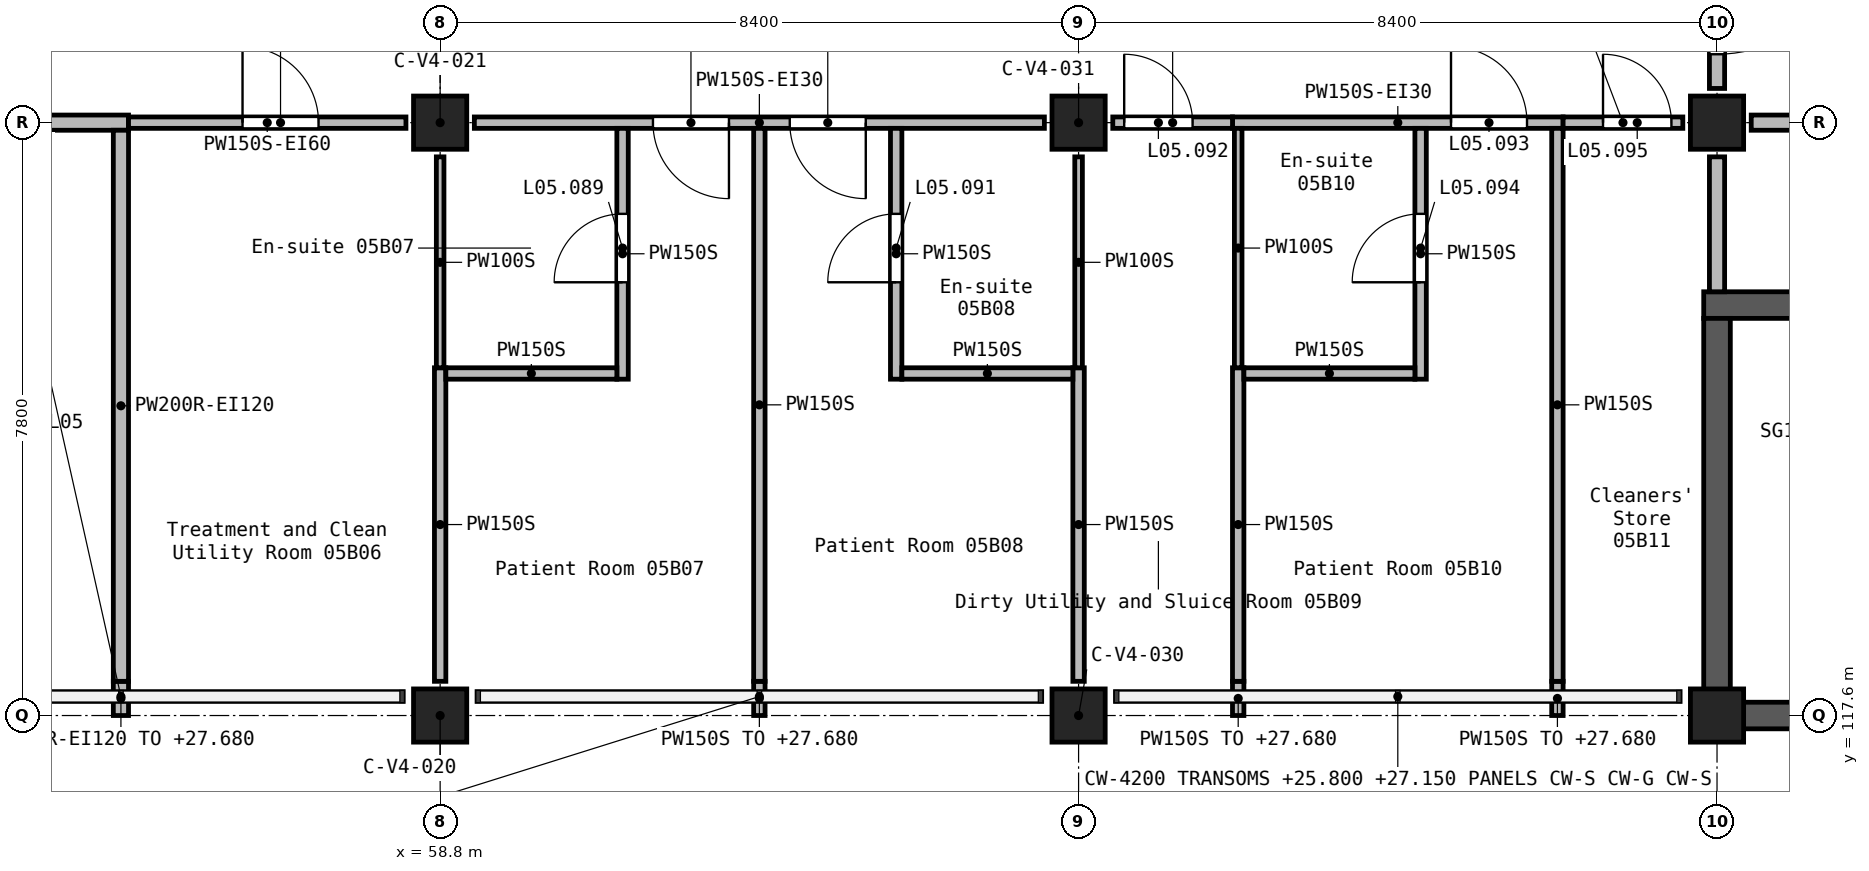
"""IFC4 building model, lengths in metres.
Left out: names, types, materials, properties, quantities, classifications, styles, units other than length and angle.
Written with IfcOpenShell. Run it as: python <this file> out.ifc"""

import sys

from ifc_helpers import new_model, si_unit, direction, frame, frame_2d, origin, origin_2d, place, context, subcontext, project, spatial, rectangle, extrude, element, fill, save


model = new_model("IFC4")
c1 = context("Model", 3, precision=1e-05, world=origin(), true_north=direction((0.0, 1.0)))
c2 = subcontext(c1, "Body", "Model", "MODEL_VIEW")
j1 = project(units=[si_unit("LENGTHUNIT", "METRE"), si_unit("PLANEANGLEUNIT", "RADIAN")], contexts=[c1])
p1 = place(None, origin())
s1 = spatial("IfcSite", under=j1, at=p1, CompositionType="ELEMENT")
p2 = place(p1, origin())
s2 = spatial("IfcBuilding", under=s1, at=p2, CompositionType="ELEMENT")
p3 = place(p2, frame((0.0, 0.0, 24.9)))
s3 = spatial("IfcBuildingStorey", under=s2, at=p3, CompositionType="ELEMENT", Elevation=24.9)
for number, where, z_axis, x_axis in (
    (1, (58.8, 117.6, 0.0), (0.0, 0.0, 1.0), (1.0, 0.0, 0.0)),
    (2, (58.8, 125.4, 0.0), (0.0, 0.0, 1.0), (1.0, 0.0, 0.0)),
    (3, (67.2, 117.6, 0.0), (0.0, 0.0, 1.0), (1.0, 0.0, 0.0)),
    (4, (67.2, 125.4, 0.0), (0.0, 0.0, 1.0), (1.0, 0.0, 0.0)),
    (5, (75.6, 117.6, 0.0), (0.0, 0.0, 1.0), (1.0, 0.0, 0.0)),
    (6, (75.6, 125.4, 0.0), (0.0, 0.0, 1.0), (1.0, 0.0, 0.0)),
):
    element("IfcColumn", number, at=place(p3, frame(where, z_axis=z_axis, x_axis=x_axis)), inside=s3, PredefinedType="COLUMN", context=c2, shape_type="SweptSolid", body=[
        extrude(rectangle(XDim=0.7, YDim=0.7, at=origin_2d()), origin(), (0.0, 0.0, 1.0), 3.9),
    ])
p4 = place(p3, frame((75.425, 123.0, 0.0), z_axis=(0.0, 0.0, 1.0), x_axis=(1.0, 0.0, 0.0)))
e7 = element("IfcWall", 7, at=p4, inside=s3, PredefinedType="SHEAR", context=c2, shape_type="SweptSolid", body=[
    extrude(rectangle(XDim=8.4, YDim=0.35, at=frame_2d((4.2, 0.0))), origin(), (0.0, 0.0, 1.0), 3.9),
])
p5 = place(p4, frame((6.875, 0.0, 0.0)))
e8 = element("IfcOpeningElement", 8, at=p5, cuts=e7, PredefinedType="OPENING", context=c2, shape_type="SweptSolid", body=[
    extrude(rectangle(XDim=1.1, YDim=2.1, at=frame_2d((0.55, 1.05))), frame((0.0, 0.185, 0.0), z_axis=(0.0, -1.0, 0.0), x_axis=(1.0, 0.0, 0.0)), (0.0, 0.0, 1.0), 0.37),
])
p6 = place(p3, frame((75.6, 117.425, 0.0), z_axis=(0.0, 0.0, 1.0), x_axis=(0.0, 1.0, 0.0)))
e9 = element("IfcWall", 9, at=p6, inside=s3, PredefinedType="SHEAR", context=c2, shape_type="SweptSolid", body=[
    extrude(rectangle(XDim=5.4, YDim=0.35, at=frame_2d((2.7, 0.0))), origin(), (0.0, 0.0, 1.0), 3.9),
])
p7 = place(p3, frame((75.775, 117.6, 0.0), z_axis=(0.0, 0.0, 1.0), x_axis=(1.0, 0.0, 0.0)))
e10 = element("IfcWall", 10, at=p7, inside=s3, PredefinedType="SHEAR", context=c2, shape_type="SweptSolid", body=[
    extrude(rectangle(XDim=8.05, YDim=0.35, at=frame_2d((4.025, 0.0))), origin(), (0.0, 0.0, 1.0), 3.9),
])
p8 = place(p3, frame((75.6, 128.55, 0.0), z_axis=(0.0, 0.0, 1.0), x_axis=(0.0, -1.0, 0.0)))
e11 = element("IfcWall", 11, at=p8, inside=s3, PredefinedType="SOLIDWALL", context=c2, shape_type="SweptSolid", body=[
    extrude(rectangle(XDim=2.7, YDim=0.2, at=frame_2d((1.35, 0.0))), origin(), (0.0, 0.0, 1.0), 3.6),
])
p9 = place(p8, frame((0.45, 0.0, 0.0)))
e12 = element("IfcOpeningElement", 12, at=p9, cuts=e11, PredefinedType="OPENING", context=c2, shape_type="SweptSolid", body=[
    extrude(rectangle(XDim=1.8, YDim=2.1, at=frame_2d((0.9, 1.05))), frame((0.0, 0.11, 0.0), z_axis=(0.0, -1.0, 0.0), x_axis=(1.0, 0.0, 0.0)), (0.0, 0.0, 1.0), 0.22),
])
p10 = place(p3, frame((75.6, 124.95, 0.0), z_axis=(0.0, 0.0, 1.0), x_axis=(0.0, -1.0, 0.0)))
e13 = element("IfcWall", 13, at=p10, inside=s3, PredefinedType="SOLIDWALL", context=c2, shape_type="SweptSolid", body=[
    extrude(rectangle(XDim=1.775, YDim=0.2, at=frame_2d((0.887, 0.0))), origin(), (0.0, 0.0, 1.0), 3.6),
])
p11 = place(p3, frame((76.05, 125.4, 0.0), z_axis=(0.0, 0.0, 1.0), x_axis=(1.0, 0.0, 0.0)))
e14 = element("IfcWall", 14, at=p11, inside=s3, PredefinedType="SOLIDWALL", context=c2, shape_type="SweptSolid", body=[
    extrude(rectangle(XDim=7.5, YDim=0.2, at=frame_2d((3.75, 0.0))), origin(), (0.0, 0.0, 1.0), 3.6),
])
p12 = place(p11, frame((3.2, 0.0, 0.0)))
e15 = element("IfcOpeningElement", 15, at=p12, cuts=e14, PredefinedType="OPENING", context=c2, shape_type="SweptSolid", body=[
    extrude(rectangle(XDim=1.1, YDim=2.1, at=frame_2d((0.55, 1.05))), frame((0.0, 0.11, 0.0), z_axis=(0.0, -1.0, 0.0), x_axis=(1.0, 0.0, 0.0)), (0.0, 0.0, 1.0), 0.22),
])
p13 = place(p3, frame((50.85, 125.4, 0.0), z_axis=(0.0, 0.0, 1.0), x_axis=(1.0, 0.0, 0.0)))
e16 = element("IfcWall", 16, at=p13, inside=s3, PredefinedType="SOLIDWALL", context=c2, shape_type="SweptSolid", body=[
    extrude(rectangle(XDim=3.85, YDim=0.2, at=frame_2d((1.925, 0.0))), origin(), (0.0, 0.0, 1.0), 3.6),
])
p14 = place(p13, frame((1.15, 0.0, 0.0)))
e17 = element("IfcOpeningElement", 17, at=p14, cuts=e16, PredefinedType="OPENING", context=c2, shape_type="SweptSolid", body=[
    extrude(rectangle(XDim=1.0, YDim=2.1, at=frame_2d((0.5, 1.05))), frame((0.0, 0.11, 0.0), z_axis=(0.0, -1.0, 0.0), x_axis=(1.0, 0.0, 0.0)), (0.0, 0.0, 1.0), 0.22),
])
p15 = place(p3, frame((54.6, 117.6, 0.0), z_axis=(0.0, 0.0, 1.0), x_axis=(0.0, 1.0, 0.0)))
e18 = element("IfcWall", 18, at=p15, inside=s3, PredefinedType="SOLIDWALL", context=c2, shape_type="SweptSolid", body=[
    extrude(rectangle(XDim=0.45, YDim=0.2, at=frame_2d((0.225, 0.0))), origin(), (0.0, 0.0, 1.0), 2.78),
])
p16 = place(p3, frame((54.6, 118.05, 0.0), z_axis=(0.0, 0.0, 1.0), x_axis=(0.0, 1.0, 0.0)))
e19 = element("IfcWall", 19, at=p16, inside=s3, PredefinedType="SOLIDWALL", context=c2, shape_type="SweptSolid", body=[
    extrude(rectangle(XDim=7.25, YDim=0.2, at=frame_2d((3.625, 0.0))), origin(), (0.0, 0.0, 1.0), 3.6),
])
p17 = place(p3, frame((66.75, 125.4, 0.0), z_axis=(0.0, 0.0, 1.0), x_axis=(-1.0, 0.0, 0.0)))
e20 = element("IfcWall", 20, at=p17, inside=s3, PredefinedType="PARTITIONING", context=c2, shape_type="SweptSolid", body=[
    extrude(rectangle(XDim=7.5, YDim=0.15, at=frame_2d((3.75, 0.0))), origin(), (0.0, 0.0, 1.0), 3.6),
])
p18 = place(p17, frame((4.15, 0.0, 0.0)))
e21 = element("IfcOpeningElement", 21, at=p18, cuts=e20, PredefinedType="OPENING", context=c2, shape_type="SweptSolid", body=[
    extrude(rectangle(XDim=1.0, YDim=2.1, at=frame_2d((0.5, 1.05))), frame((0.0, 0.085, 0.0), z_axis=(0.0, -1.0, 0.0), x_axis=(1.0, 0.0, 0.0)), (0.0, 0.0, 1.0), 0.17),
])
p19 = place(p17, frame((2.35, 0.0, 0.0)))
e22 = element("IfcOpeningElement", 22, at=p19, cuts=e20, PredefinedType="OPENING", context=c2, shape_type="SweptSolid", body=[
    extrude(rectangle(XDim=1.0, YDim=2.1, at=frame_2d((0.5, 1.05))), frame((0.0, 0.085, 0.0), z_axis=(0.0, -1.0, 0.0), x_axis=(1.0, 0.0, 0.0)), (0.0, 0.0, 1.0), 0.17),
])
p20 = place(p3, frame((69.225, 125.4, 0.0), z_axis=(0.0, 0.0, 1.0), x_axis=(1.0, 0.0, 0.0)))
e23 = element("IfcWall", 23, at=p20, inside=s3, PredefinedType="PARTITIONING", context=c2, shape_type="SweptSolid", body=[
    extrude(rectangle(XDim=4.35, YDim=0.15, at=frame_2d((2.175, 0.0))), origin(), (0.0, 0.0, 1.0), 3.6),
])
p21 = place(p20, frame((2.875, 0.0, 0.0)))
e24 = element("IfcOpeningElement", 24, at=p21, cuts=e23, PredefinedType="OPENING", context=c2, shape_type="SweptSolid", body=[
    extrude(rectangle(XDim=1.0, YDim=2.1, at=frame_2d((0.5, 1.05))), frame((0.0, 0.085, 0.0), z_axis=(0.0, -1.0, 0.0), x_axis=(1.0, 0.0, 0.0)), (0.0, 0.0, 1.0), 0.17),
])
p22 = place(p3, frame((54.7, 125.4, 0.0), z_axis=(0.0, 0.0, 1.0), x_axis=(1.0, 0.0, 0.0)))
e25 = element("IfcWall", 25, at=p22, inside=s3, PredefinedType="PARTITIONING", context=c2, shape_type="SweptSolid", body=[
    extrude(rectangle(XDim=3.65, YDim=0.15, at=frame_2d((1.825, 0.0))), origin(), (0.0, 0.0, 1.0), 3.6),
])
p23 = place(p22, frame((1.5, 0.0, 0.0)))
e26 = element("IfcOpeningElement", 26, at=p23, cuts=e25, PredefinedType="OPENING", context=c2, shape_type="SweptSolid", body=[
    extrude(rectangle(XDim=1.0, YDim=2.1, at=frame_2d((0.5, 1.05))), frame((0.0, 0.085, 0.0), z_axis=(0.0, -1.0, 0.0), x_axis=(1.0, 0.0, 0.0)), (0.0, 0.0, 1.0), 0.17),
])
p24 = place(p3, frame((67.65, 125.4, 0.0), z_axis=(0.0, 0.0, 1.0), x_axis=(1.0, 0.0, 0.0)))
e27 = element("IfcWall", 27, at=p24, inside=s3, PredefinedType="PARTITIONING", context=c2, shape_type="SweptSolid", body=[
    extrude(rectangle(XDim=1.575, YDim=0.15, at=frame_2d((0.788, 0.0))), origin(), (0.0, 0.0, 1.0), 3.6),
])
p25 = place(p24, frame((0.15, 0.0, 0.0)))
e28 = element("IfcOpeningElement", 28, at=p25, cuts=e27, PredefinedType="OPENING", context=c2, shape_type="SweptSolid", body=[
    extrude(rectangle(XDim=0.9, YDim=2.1, at=frame_2d((0.45, 1.05))), frame((0.0, 0.085, 0.0), z_axis=(0.0, -1.0, 0.0), x_axis=(1.0, 0.0, 0.0)), (0.0, 0.0, 1.0), 0.17),
])
p26 = place(p3, frame((73.575, 125.4, 0.0), z_axis=(0.0, 0.0, 1.0), x_axis=(1.0, 0.0, 0.0)))
e29 = element("IfcWall", 29, at=p26, inside=s3, PredefinedType="PARTITIONING", context=c2, shape_type="SweptSolid", body=[
    extrude(rectangle(XDim=1.575, YDim=0.15, at=frame_2d((0.788, 0.0))), origin(), (0.0, 0.0, 1.0), 3.6),
])
p27 = place(p26, frame((0.525, 0.0, 0.0)))
e30 = element("IfcOpeningElement", 30, at=p27, cuts=e29, PredefinedType="OPENING", context=c2, shape_type="SweptSolid", body=[
    extrude(rectangle(XDim=0.9, YDim=2.1, at=frame_2d((0.45, 1.05))), frame((0.0, 0.085, 0.0), z_axis=(0.0, -1.0, 0.0), x_axis=(1.0, 0.0, 0.0)), (0.0, 0.0, 1.0), 0.17),
])
p28 = place(p3, frame((63.0, 117.6, 0.0), z_axis=(0.0, 0.0, 1.0), x_axis=(0.0, 1.0, 0.0)))
e31 = element("IfcWall", 31, at=p28, inside=s3, PredefinedType="PARTITIONING", context=c2, shape_type="SweptSolid", body=[
    extrude(rectangle(XDim=0.45, YDim=0.15, at=frame_2d((0.225, 0.0))), origin(), (0.0, 0.0, 1.0), 2.78),
])
p29 = place(p3, frame((63.0, 118.05, 0.0), z_axis=(0.0, 0.0, 1.0), x_axis=(0.0, 1.0, 0.0)))
e32 = element("IfcWall", 32, at=p29, inside=s3, PredefinedType="PARTITIONING", context=c2, shape_type="SweptSolid", body=[
    extrude(rectangle(XDim=7.275, YDim=0.15, at=frame_2d((3.637, 0.0))), origin(), (0.0, 0.0, 1.0), 3.6),
])
p30 = place(p3, frame((73.5, 117.6, 0.0), z_axis=(0.0, 0.0, 1.0), x_axis=(0.0, 1.0, 0.0)))
e33 = element("IfcWall", 33, at=p30, inside=s3, PredefinedType="PARTITIONING", context=c2, shape_type="SweptSolid", body=[
    extrude(rectangle(XDim=0.45, YDim=0.15, at=frame_2d((0.225, 0.0))), origin(), (0.0, 0.0, 1.0), 2.78),
])
p31 = place(p3, frame((73.5, 118.05, 0.0), z_axis=(0.0, 0.0, 1.0), x_axis=(0.0, 1.0, 0.0)))
e34 = element("IfcWall", 34, at=p31, inside=s3, PredefinedType="PARTITIONING", context=c2, shape_type="SweptSolid", body=[
    extrude(rectangle(XDim=7.275, YDim=0.15, at=frame_2d((3.637, 0.0))), origin(), (0.0, 0.0, 1.0), 3.6),
])
for number, where, z_axis, x_axis in (
    (35, (58.8, 118.05, 0.0), (0.0, 0.0, 1.0), (0.0, 1.0, 0.0)),
    (36, (67.2, 118.05, 0.0), (0.0, 0.0, 1.0), (0.0, 1.0, 0.0)),
):
    element("IfcWall", number, at=place(p3, frame(where, z_axis=z_axis, x_axis=x_axis)), inside=s3, PredefinedType="PARTITIONING", context=c2, shape_type="SweptSolid", body=[
        extrude(rectangle(XDim=4.125, YDim=0.15, at=frame_2d((2.062, 0.0))), origin(), (0.0, 0.0, 1.0), 3.6),
    ])
p32 = place(p3, frame((69.3, 117.6, 0.0), z_axis=(0.0, 0.0, 1.0), x_axis=(0.0, 1.0, 0.0)))
e37 = element("IfcWall", 37, at=p32, inside=s3, PredefinedType="PARTITIONING", context=c2, shape_type="SweptSolid", body=[
    extrude(rectangle(XDim=0.45, YDim=0.15, at=frame_2d((0.225, 0.0))), origin(), (0.0, 0.0, 1.0), 2.78),
])
p33 = place(p3, frame((69.3, 118.05, 0.0), z_axis=(0.0, 0.0, 1.0), x_axis=(0.0, 1.0, 0.0)))
e38 = element("IfcWall", 38, at=p33, inside=s3, PredefinedType="PARTITIONING", context=c2, shape_type="SweptSolid", body=[
    extrude(rectangle(XDim=4.125, YDim=0.15, at=frame_2d((2.062, 0.0))), origin(), (0.0, 0.0, 1.0), 3.6),
])
p34 = place(p3, frame((61.2, 122.025, 0.0), z_axis=(0.0, 0.0, 1.0), x_axis=(0.0, 1.0, 0.0)))
e39 = element("IfcWall", 39, at=p34, inside=s3, PredefinedType="PARTITIONING", context=c2, shape_type="SweptSolid", body=[
    extrude(rectangle(XDim=3.3, YDim=0.15, at=frame_2d((1.65, 0.0))), origin(), (0.0, 0.0, 1.0), 3.6),
])
p35 = place(p34, frame((1.275, 0.0, 0.0)))
e40 = element("IfcOpeningElement", 40, at=p35, cuts=e39, PredefinedType="OPENING", context=c2, shape_type="SweptSolid", body=[
    extrude(rectangle(XDim=0.9, YDim=2.1, at=frame_2d((0.45, 1.05))), frame((0.0, 0.085, 0.0), z_axis=(0.0, -1.0, 0.0), x_axis=(1.0, 0.0, 0.0)), (0.0, 0.0, 1.0), 0.17),
])
p36 = place(p3, frame((64.8, 122.025, 0.0), z_axis=(0.0, 0.0, 1.0), x_axis=(0.0, 1.0, 0.0)))
e41 = element("IfcWall", 41, at=p36, inside=s3, PredefinedType="PARTITIONING", context=c2, shape_type="SweptSolid", body=[
    extrude(rectangle(XDim=3.3, YDim=0.15, at=frame_2d((1.65, 0.0))), origin(), (0.0, 0.0, 1.0), 3.6),
])
p37 = place(p36, frame((1.275, 0.0, 0.0)))
e42 = element("IfcOpeningElement", 42, at=p37, cuts=e41, PredefinedType="OPENING", context=c2, shape_type="SweptSolid", body=[
    extrude(rectangle(XDim=0.9, YDim=2.1, at=frame_2d((0.45, 1.05))), frame((0.0, 0.085, 0.0), z_axis=(0.0, -1.0, 0.0), x_axis=(1.0, 0.0, 0.0)), (0.0, 0.0, 1.0), 0.17),
])
p38 = place(p3, frame((71.7, 122.025, 0.0), z_axis=(0.0, 0.0, 1.0), x_axis=(0.0, 1.0, 0.0)))
e43 = element("IfcWall", 43, at=p38, inside=s3, PredefinedType="PARTITIONING", context=c2, shape_type="SweptSolid", body=[
    extrude(rectangle(XDim=3.3, YDim=0.15, at=frame_2d((1.65, 0.0))), origin(), (0.0, 0.0, 1.0), 3.6),
])
p39 = place(p38, frame((1.275, 0.0, 0.0)))
e44 = element("IfcOpeningElement", 44, at=p39, cuts=e43, PredefinedType="OPENING", context=c2, shape_type="SweptSolid", body=[
    extrude(rectangle(XDim=0.9, YDim=2.1, at=frame_2d((0.45, 1.05))), frame((0.0, 0.085, 0.0), z_axis=(0.0, -1.0, 0.0), x_axis=(1.0, 0.0, 0.0)), (0.0, 0.0, 1.0), 0.17),
])
for number, where, z_axis, x_axis in (
    (45, (58.875, 122.1, 0.0), (0.0, 0.0, 1.0), (1.0, 0.0, 0.0)),
    (46, (64.875, 122.1, 0.0), (0.0, 0.0, 1.0), (1.0, 0.0, 0.0)),
    (47, (69.375, 122.1, 0.0), (0.0, 0.0, 1.0), (1.0, 0.0, 0.0)),
):
    element("IfcWall", number, at=place(p3, frame(where, z_axis=z_axis, x_axis=x_axis)), inside=s3, PredefinedType="PARTITIONING", context=c2, shape_type="SweptSolid", body=[
        extrude(rectangle(XDim=2.25, YDim=0.15, at=frame_2d((1.125, 0.0))), origin(), (0.0, 0.0, 1.0), 3.6),
    ])
for number, where, z_axis, x_axis in (
    (48, (58.8, 122.175, 0.0), (0.0, 0.0, 1.0), (0.0, 1.0, 0.0)),
    (49, (67.2, 122.175, 0.0), (0.0, 0.0, 1.0), (0.0, 1.0, 0.0)),
):
    element("IfcWall", number, at=place(p3, frame(where, z_axis=z_axis, x_axis=x_axis)), inside=s3, PredefinedType="PARTITIONING", context=c2, shape_type="SweptSolid", body=[
        extrude(rectangle(XDim=2.775, YDim=0.1, at=frame_2d((1.387, 0.0))), origin(), (0.0, 0.0, 1.0), 3.6),
    ])
p40 = place(p3, frame((69.3, 122.175, 0.0), z_axis=(0.0, 0.0, 1.0), x_axis=(0.0, 1.0, 0.0)))
e50 = element("IfcWall", 50, at=p40, inside=s3, PredefinedType="PARTITIONING", context=c2, shape_type="SweptSolid", body=[
    extrude(rectangle(XDim=3.15, YDim=0.1, at=frame_2d((1.575, 0.0))), origin(), (0.0, 0.0, 1.0), 3.6),
])
p41 = place(p9, origin())
e51 = element("IfcDoor", 51, at=p41, inside=s3, OperationType="DOUBLE_DOOR_SINGLE_SWING", PredefinedType="DOOR", context=c2, shape_type="SweptSolid", body=[
    extrude(rectangle(XDim=1.8, YDim=2.1, at=frame_2d((0.9, 1.05))), frame((0.0, 0.025, 0.0), z_axis=(0.0, -1.0, 0.0), x_axis=(1.0, 0.0, 0.0)), (0.0, 0.0, 1.0), 0.05),
])
fill(e12, e51)
p42 = place(p23, frame((1.0, 0.0, 0.0), z_axis=(0.0, 0.0, 1.0), x_axis=(-1.0, 0.0, 0.0)))
e52 = element("IfcDoor", 52, at=p42, inside=s3, OperationType="SINGLE_SWING_LEFT", PredefinedType="DOOR", context=c2, shape_type="SweptSolid", body=[
    extrude(rectangle(XDim=1.0, YDim=2.1, at=frame_2d((0.5, 1.05))), frame((0.0, 0.025, 0.0), z_axis=(0.0, -1.0, 0.0), x_axis=(1.0, 0.0, 0.0)), (0.0, 0.0, 1.0), 0.05),
])
fill(e26, e52)
p43 = place(p18, origin())
e53 = element("IfcDoor", 53, at=p43, inside=s3, OperationType="SINGLE_SWING_RIGHT", PredefinedType="DOOR", context=c2, shape_type="SweptSolid", body=[
    extrude(rectangle(XDim=1.0, YDim=2.1, at=frame_2d((0.5, 1.05))), frame((0.0, 0.025, 0.0), z_axis=(0.0, -1.0, 0.0), x_axis=(1.0, 0.0, 0.0)), (0.0, 0.0, 1.0), 0.05),
])
fill(e21, e53)
p44 = place(p35, origin())
e54 = element("IfcDoor", 54, at=p44, inside=s3, OperationType="SINGLE_SWING_RIGHT", PredefinedType="DOOR", context=c2, shape_type="SweptSolid", body=[
    extrude(rectangle(XDim=0.9, YDim=2.1, at=frame_2d((0.45, 1.05))), frame((0.0, 0.025, 0.0), z_axis=(0.0, -1.0, 0.0), x_axis=(1.0, 0.0, 0.0)), (0.0, 0.0, 1.0), 0.05),
])
fill(e40, e54)
p45 = place(p19, origin())
e55 = element("IfcDoor", 55, at=p45, inside=s3, OperationType="SINGLE_SWING_LEFT", PredefinedType="DOOR", context=c2, shape_type="SweptSolid", body=[
    extrude(rectangle(XDim=1.0, YDim=2.1, at=frame_2d((0.5, 1.05))), frame((0.0, 0.025, 0.0), z_axis=(0.0, -1.0, 0.0), x_axis=(1.0, 0.0, 0.0)), (0.0, 0.0, 1.0), 0.05),
])
fill(e22, e55)
p46 = place(p37, frame((0.9, 0.0, 0.0), z_axis=(0.0, 0.0, 1.0), x_axis=(-1.0, 0.0, 0.0)))
e56 = element("IfcDoor", 56, at=p46, inside=s3, OperationType="SINGLE_SWING_LEFT", PredefinedType="DOOR", context=c2, shape_type="SweptSolid", body=[
    extrude(rectangle(XDim=0.9, YDim=2.1, at=frame_2d((0.45, 1.05))), frame((0.0, 0.025, 0.0), z_axis=(0.0, -1.0, 0.0), x_axis=(1.0, 0.0, 0.0)), (0.0, 0.0, 1.0), 0.05),
])
fill(e42, e56)
p47 = place(p25, frame((0.9, 0.0, 0.0), z_axis=(0.0, 0.0, 1.0), x_axis=(-1.0, 0.0, 0.0)))
e57 = element("IfcDoor", 57, at=p47, inside=s3, OperationType="SINGLE_SWING_RIGHT", PredefinedType="DOOR", context=c2, shape_type="SweptSolid", body=[
    extrude(rectangle(XDim=0.9, YDim=2.1, at=frame_2d((0.45, 1.05))), frame((0.0, 0.025, 0.0), z_axis=(0.0, -1.0, 0.0), x_axis=(1.0, 0.0, 0.0)), (0.0, 0.0, 1.0), 0.05),
])
fill(e28, e57)
p48 = place(p21, frame((1.0, 0.0, 0.0), z_axis=(0.0, 0.0, 1.0), x_axis=(-1.0, 0.0, 0.0)))
e58 = element("IfcDoor", 58, at=p48, inside=s3, OperationType="SINGLE_SWING_LEFT", PredefinedType="DOOR", context=c2, shape_type="SweptSolid", body=[
    extrude(rectangle(XDim=1.0, YDim=2.1, at=frame_2d((0.5, 1.05))), frame((0.0, 0.025, 0.0), z_axis=(0.0, -1.0, 0.0), x_axis=(1.0, 0.0, 0.0)), (0.0, 0.0, 1.0), 0.05),
])
fill(e24, e58)
p49 = place(p39, origin())
e59 = element("IfcDoor", 59, at=p49, inside=s3, OperationType="SINGLE_SWING_RIGHT", PredefinedType="DOOR", context=c2, shape_type="SweptSolid", body=[
    extrude(rectangle(XDim=0.9, YDim=2.1, at=frame_2d((0.45, 1.05))), frame((0.0, 0.025, 0.0), z_axis=(0.0, -1.0, 0.0), x_axis=(1.0, 0.0, 0.0)), (0.0, 0.0, 1.0), 0.05),
])
fill(e44, e59)
p50 = place(p27, frame((0.9, 0.0, 0.0), z_axis=(0.0, 0.0, 1.0), x_axis=(-1.0, 0.0, 0.0)))
e60 = element("IfcDoor", 60, at=p50, inside=s3, OperationType="SINGLE_SWING_LEFT", PredefinedType="DOOR", context=c2, shape_type="SweptSolid", body=[
    extrude(rectangle(XDim=0.9, YDim=2.1, at=frame_2d((0.45, 1.05))), frame((0.0, 0.025, 0.0), z_axis=(0.0, -1.0, 0.0), x_axis=(1.0, 0.0, 0.0)), (0.0, 0.0, 1.0), 0.05),
])
fill(e30, e60)
save(model, sys.argv[1])
